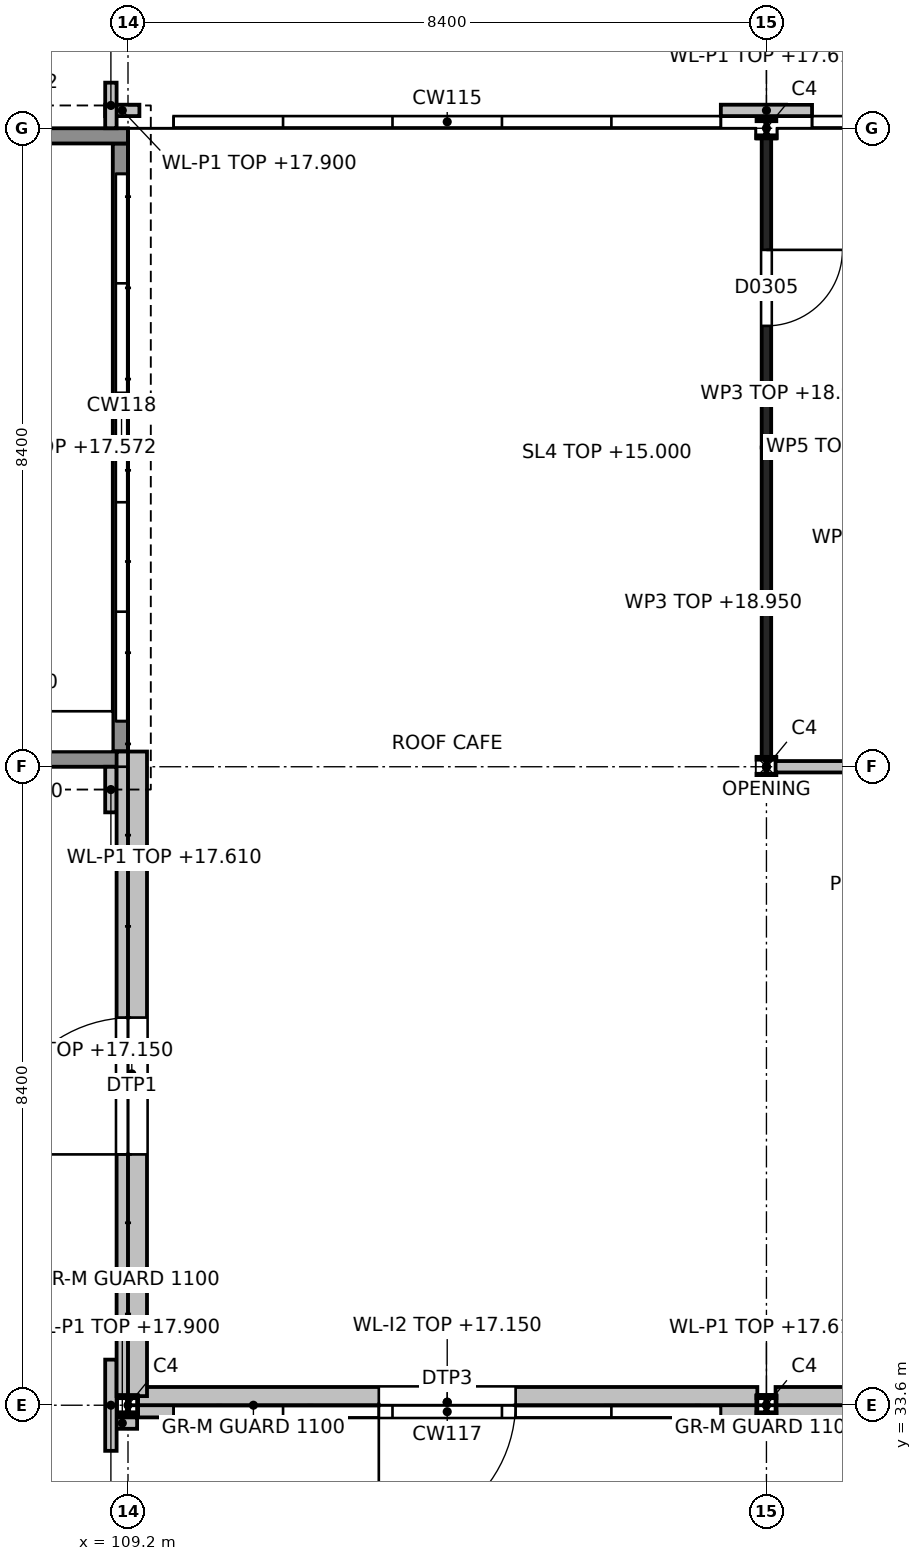
"""IFC4 building model, lengths in metres.
Left out: names, types, materials, properties, quantities, classifications, styles, units other than length and angle.
Written with IfcOpenShell. Run it as: python <this file> out.ifc"""

import sys

from ifc_helpers import new_model, si_unit, direction, frame, frame_2d, origin, origin_2d, place, context, subcontext, project, spatial, polyline, rectangle, i_section, outline, extrude, element, fill, save


model = new_model("IFC4")
c1 = context("Model", 3, precision=1e-05, world=origin(), true_north=direction((0.0, 1.0)))
c2 = subcontext(c1, "Body", "Model", "MODEL_VIEW")
j1 = project(units=[si_unit("LENGTHUNIT", "METRE"), si_unit("PLANEANGLEUNIT", "RADIAN")], contexts=[c1])
p1 = place(None, origin())
s1 = spatial("IfcSite", under=j1, at=p1, CompositionType="ELEMENT")
p2 = place(p1, origin())
s2 = spatial("IfcBuilding", under=s1, at=p2, CompositionType="ELEMENT")
p3 = place(p2, frame((0.0, 0.0, 15.0)))
s3 = spatial("IfcBuildingStorey", under=s2, at=p3, CompositionType="ELEMENT", Elevation=15.0)
for number, where, z_axis, x_axis in (
    (1, (109.2, 33.6, 0.0), (0.0, 0.0, 1.0), (1.0, 0.0, 0.0)),
    (2, (117.6, 33.6, 0.0), (0.0, 0.0, 1.0), (1.0, 0.0, 0.0)),
):
    element("IfcColumn", number, at=place(p3, frame(where, z_axis=z_axis, x_axis=x_axis)), inside=s3, PredefinedType="COLUMN", context=c2, shape_type="SweptSolid", body=[
        extrude(i_section(OverallWidth=0.24, OverallDepth=0.24, WebThickness=0.01, FlangeThickness=0.017, at=origin_2d()), origin(), (0.0, 0.0, 1.0), 2.635),
    ])
p4 = place(p3, frame((117.6, 42.0, 0.0), z_axis=(0.0, 0.0, 1.0), x_axis=(1.0, 0.0, 0.0)))
e3 = element("IfcColumn", 3, at=p4, inside=s3, PredefinedType="COLUMN", context=c2, shape_type="SweptSolid", body=[
    extrude(i_section(OverallWidth=0.24, OverallDepth=0.24, WebThickness=0.01, FlangeThickness=0.017, at=origin_2d()), origin(), (0.0, 0.0, 1.0), 10.198),
])
p5 = place(p3, frame((117.6, 50.4, 0.0), z_axis=(0.0, 0.0, 1.0), x_axis=(1.0, 0.0, 0.0)))
e4 = element("IfcColumn", 4, at=p5, inside=s3, PredefinedType="COLUMN", context=c2, shape_type="SweptSolid", body=[
    extrude(i_section(OverallWidth=0.24, OverallDepth=0.24, WebThickness=0.01, FlangeThickness=0.017, at=origin_2d()), origin(), (0.0, 0.0, 1.0), 2.635),
])
p6 = place(p3, frame((105.0, 42.1, 0.0), z_axis=(0.0, 0.0, 1.0), x_axis=(1.0, 0.0, 0.0)))
e5 = element("IfcWall", 5, at=p6, inside=s3, PredefinedType="SHEAR", context=c2, shape_type="SweptSolid", body=[
    extrude(outline(polyline([(0.0, 0.0), (4.2, 0.0), (4.2, 2.572), (3.953, 3.02), (0.0, 3.02), (0.0, 0.0)])), frame((0.0, 0.1, 0.0), z_axis=(0.0, -1.0, 0.0), x_axis=(1.0, 0.0, 0.0)), (0.0, 0.0, 1.0), 0.2),
])
p7 = place(p6, frame((1.55, 0.0, 0.0)))
e6 = element("IfcOpeningElement", 6, at=p7, cuts=e5, PredefinedType="OPENING", context=c2, shape_type="SweptSolid", body=[
    extrude(rectangle(XDim=1.1, YDim=2.1, at=frame_2d((0.55, 1.05))), frame((0.0, 0.1, 0.0), z_axis=(0.0, -1.0, 0.0), x_axis=(1.0, 0.0, 0.0)), (0.0, 0.0, 1.0), 0.2),
])
p8 = place(p3, frame((105.0, 50.3, 0.0), z_axis=(0.0, 0.0, 1.0), x_axis=(1.0, 0.0, 0.0)))
e7 = element("IfcWall", 7, at=p8, inside=s3, PredefinedType="SHEAR", context=c2, shape_type="SweptSolid", body=[
    extrude(outline(polyline([(0.0, 0.0), (4.2, 0.0), (4.2, 2.572), (0.0, 2.572), (0.0, 0.0)])), frame((0.0, 0.1, 0.0), z_axis=(0.0, -1.0, 0.0), x_axis=(1.0, 0.0, 0.0)), (0.0, 0.0, 1.0), 0.2),
])
p9 = place(p3, frame((109.1, 42.2, 0.0), z_axis=(0.0, 0.0, 1.0), x_axis=(0.0, 1.0, 0.0)))
e8 = element("IfcWall", 8, at=p9, inside=s3, PredefinedType="SHEAR", context=c2, shape_type="SweptSolid", body=[
    extrude(outline(polyline([(0.0, 0.0), (8.0, 0.0), (8.0, 2.572), (0.0, 2.572), (0.0, 0.0)])), frame((0.0, 0.1, 0.0), z_axis=(0.0, -1.0, 0.0), x_axis=(1.0, 0.0, 0.0)), (0.0, 0.0, 1.0), 0.2),
])
p10 = place(p3, frame((108.9, 50.635, 0.0), z_axis=(0.0, 0.0, 1.0), x_axis=(1.0, 0.0, 0.0)))
e9 = element("IfcWall", 9, at=p10, inside=s3, PredefinedType="SOLIDWALL", context=c2, shape_type="SweptSolid", body=[
    extrude(rectangle(XDim=0.45, YDim=0.15, at=frame_2d((0.225, 0.0))), origin(), (0.0, 0.0, 1.0), 2.9),
])
p11 = place(p3, frame((117.0, 50.635, 0.0), z_axis=(0.0, 0.0, 1.0), x_axis=(1.0, 0.0, 0.0)))
e10 = element("IfcWall", 10, at=p11, inside=s3, PredefinedType="SOLIDWALL", context=c2, shape_type="SweptSolid", body=[
    extrude(rectangle(XDim=1.2, YDim=0.15, at=frame_2d((0.6, 0.0))), origin(), (0.0, 0.0, 1.0), 2.61),
])
p12 = place(p3, frame((109.32, 33.64, 0.0), z_axis=(0.0, 0.0, 1.0), x_axis=(1.0, 0.0, 0.0)))
e11 = element("IfcWall", 11, at=p12, inside=s3, PredefinedType="SOLIDWALL", context=c2, shape_type="SweptSolid", body=[
    extrude(rectangle(XDim=8.16, YDim=0.4, at=frame_2d((4.08, 0.0))), origin(), (0.0, 0.0, 1.0), 2.15),
])
p13 = place(p12, frame((3.18, 0.0, 0.0)))
e12 = element("IfcOpeningElement", 12, at=p13, cuts=e11, PredefinedType="OPENING", context=c2, shape_type="SweptSolid", body=[
    extrude(rectangle(XDim=1.8, YDim=2.4, at=frame_2d((0.9, 1.2))), frame((0.0, 0.2, 0.0), z_axis=(0.0, -1.0, 0.0), x_axis=(1.0, 0.0, 0.0)), (0.0, 0.0, 1.0), 0.4),
])
p14 = place(p3, frame((117.72, 33.64, 0.0), z_axis=(0.0, 0.0, 1.0), x_axis=(1.0, 0.0, 0.0)))
e13 = element("IfcWall", 13, at=p14, inside=s3, PredefinedType="SOLIDWALL", context=c2, shape_type="SweptSolid", body=[
    extrude(rectangle(XDim=8.16, YDim=0.4, at=frame_2d((4.08, 0.0))), origin(), (0.0, 0.0, 1.0), 2.15),
])
p15 = place(p14, frame((3.18, 0.0, 0.0)))
e14 = element("IfcOpeningElement", 14, at=p15, cuts=e13, PredefinedType="OPENING", context=c2, shape_type="SweptSolid", body=[
    extrude(rectangle(XDim=1.8, YDim=2.4, at=frame_2d((0.9, 1.2))), frame((0.0, 0.2, 0.0), z_axis=(0.0, -1.0, 0.0), x_axis=(1.0, 0.0, 0.0)), (0.0, 0.0, 1.0), 0.4),
])
p16 = place(p3, frame((108.93, 33.365, 0.0), z_axis=(0.0, 0.0, 1.0), x_axis=(1.0, 0.0, 0.0)))
e15 = element("IfcWall", 15, at=p16, inside=s3, PredefinedType="SOLIDWALL", context=c2, shape_type="SweptSolid", body=[
    extrude(rectangle(XDim=0.39, YDim=0.15, at=frame_2d((0.195, 0.0))), origin(), (0.0, 0.0, 1.0), 2.9),
])
p17 = place(p3, frame((117.0, 33.365, 0.0), z_axis=(0.0, 0.0, 1.0), x_axis=(1.0, 0.0, 0.0)))
e16 = element("IfcWall", 16, at=p17, inside=s3, PredefinedType="SOLIDWALL", context=c2, shape_type="SweptSolid", body=[
    extrude(rectangle(XDim=1.2, YDim=0.15, at=frame_2d((0.6, 0.0))), origin(), (0.0, 0.0, 1.0), 2.61),
])
p18 = place(p3, frame((109.25, 33.72, 0.0), z_axis=(0.0, 0.0, 1.0), x_axis=(0.0, 1.0, 0.0)))
e17 = element("IfcWall", 17, at=p18, inside=s3, PredefinedType="SOLIDWALL", context=c2, shape_type="SweptSolid", body=[
    extrude(rectangle(XDim=8.48, YDim=0.4, at=frame_2d((4.24, 0.0))), origin(), (0.0, 0.0, 1.0), 2.15),
])
p19 = place(p18, frame((3.18, 0.0, 0.0)))
e18 = element("IfcOpeningElement", 18, at=p19, cuts=e17, PredefinedType="OPENING", context=c2, shape_type="SweptSolid", body=[
    extrude(rectangle(XDim=1.8, YDim=2.4, at=frame_2d((0.9, 1.2))), frame((0.0, 0.2, 0.0), z_axis=(0.0, -1.0, 0.0), x_axis=(1.0, 0.0, 0.0)), (0.0, 0.0, 1.0), 0.4),
])
p20 = place(p3, frame((108.975, 33.0, 0.0), z_axis=(0.0, 0.0, 1.0), x_axis=(0.0, 1.0, 0.0)))
e19 = element("IfcWall", 19, at=p20, inside=s3, PredefinedType="SOLIDWALL", context=c2, shape_type="SweptSolid", body=[
    extrude(rectangle(XDim=1.2, YDim=0.15, at=frame_2d((0.6, 0.0))), origin(), (0.0, 0.0, 1.0), 2.61),
])
p21 = place(p3, frame((108.975, 41.4, 0.0), z_axis=(0.0, 0.0, 1.0), x_axis=(0.0, 1.0, 0.0)))
e20 = element("IfcWall", 20, at=p21, inside=s3, PredefinedType="SOLIDWALL", context=c2, shape_type="SweptSolid", body=[
    extrude(rectangle(XDim=0.6, YDim=0.15, at=frame_2d((0.3, 0.0))), origin(), (0.0, 0.0, 1.0), 2.61),
])
p22 = place(p3, frame((108.975, 50.4, 0.0), z_axis=(0.0, 0.0, 1.0), x_axis=(0.0, 1.0, 0.0)))
e21 = element("IfcWall", 21, at=p22, inside=s3, PredefinedType="SOLIDWALL", context=c2, shape_type="SweptSolid", body=[
    extrude(rectangle(XDim=0.6, YDim=0.15, at=frame_2d((0.3, 0.0))), origin(), (0.0, 0.0, 1.0), 2.9),
])
p23 = place(p3, frame((117.6, 42.12, 0.0), z_axis=(0.0, 0.0, 1.0), x_axis=(0.0, 1.0, 0.0)))
e22 = element("IfcWall", 22, at=p23, inside=s3, PredefinedType="PARTITIONING", context=c2, shape_type="SweptSolid", body=[
    extrude(rectangle(XDim=4.08, YDim=0.125, at=frame_2d((2.04, 0.0))), origin(), (0.0, 0.0, 1.0), 3.95),
])
p24 = place(p3, frame((117.6, 46.2, 0.0), z_axis=(0.0, 0.0, 1.0), x_axis=(0.0, 1.0, 0.0)))
e23 = element("IfcWall", 23, at=p24, inside=s3, PredefinedType="PARTITIONING", context=c2, shape_type="SweptSolid", body=[
    extrude(rectangle(XDim=4.08, YDim=0.125, at=frame_2d((2.04, 0.0))), origin(), (0.0, 0.0, 1.0), 3.95),
])
p25 = place(p24, frame((1.6, 0.0, 0.0)))
e24 = element("IfcOpeningElement", 24, at=p25, cuts=e23, PredefinedType="OPENING", context=c2, shape_type="SweptSolid", body=[
    extrude(rectangle(XDim=1.0, YDim=2.1, at=frame_2d((0.5, 1.05))), frame((0.0, 0.062, 0.0), z_axis=(0.0, -1.0, 0.0), x_axis=(1.0, 0.0, 0.0)), (0.0, 0.0, 1.0), 0.125),
])
p26 = place(p3, frame((117.72, 42.0, 0.0), z_axis=(0.0, 0.0, 1.0), x_axis=(1.0, 0.0, 0.0)))
e25 = element("IfcWall", 25, at=p26, inside=s3, PredefinedType="PARTITIONING", context=c2, shape_type="SweptSolid", body=[
    extrude(rectangle(XDim=4.08, YDim=0.15, at=frame_2d((2.04, 0.0))), origin(), (0.0, 0.0, 1.0), 3.95),
])
p27 = place(p26, frame((1.48, 0.0, 0.0)))
e26 = element("IfcOpeningElement", 26, at=p27, cuts=e25, PredefinedType="OPENING", context=c2, shape_type="SweptSolid", body=[
    extrude(rectangle(XDim=0.9, YDim=2.1, at=frame_2d((0.45, 1.05))), frame((0.0, 0.075, 0.0), z_axis=(0.0, -1.0, 0.0), x_axis=(1.0, 0.0, 0.0)), (0.0, 0.0, 1.0), 0.15),
])
p28 = place(p3, frame((117.6, 46.2, 0.0), z_axis=(0.0, 0.0, 1.0), x_axis=(1.0, 0.0, 0.0)))
e27 = element("IfcWall", 27, at=p28, inside=s3, PredefinedType="PARTITIONING", context=c2, shape_type="SweptSolid", body=[
    extrude(rectangle(XDim=4.2, YDim=0.125, at=frame_2d((2.1, 0.0))), origin(), (0.0, 0.0, 1.0), 3.95),
])
p29 = place(p13, origin())
e28 = element("IfcDoor", 28, at=p29, inside=s3, OperationType="DOUBLE_DOOR_SINGLE_SWING", PredefinedType="DOOR", context=c2, shape_type="SweptSolid", body=[
    extrude(rectangle(XDim=1.8, YDim=2.4, at=frame_2d((0.9, 1.2))), frame((0.0, 0.025, 0.0), z_axis=(0.0, -1.0, 0.0), x_axis=(1.0, 0.0, 0.0)), (0.0, 0.0, 1.0), 0.05),
])
fill(e12, e28)
p30 = place(p19, origin())
e29 = element("IfcDoor", 29, at=p30, inside=s3, OperationType="DOUBLE_DOOR_SINGLE_SWING", PredefinedType="DOOR", context=c2, shape_type="SweptSolid", body=[
    extrude(rectangle(XDim=1.8, YDim=2.4, at=frame_2d((0.9, 1.2))), frame((0.0, 0.025, 0.0), z_axis=(0.0, -1.0, 0.0), x_axis=(1.0, 0.0, 0.0)), (0.0, 0.0, 1.0), 0.05),
])
fill(e18, e29)
p31 = place(p25, origin())
e30 = element("IfcDoor", 30, at=p31, inside=s3, OperationType="SINGLE_SWING_RIGHT", PredefinedType="DOOR", context=c2, shape_type="SweptSolid", body=[
    extrude(rectangle(XDim=1.0, YDim=2.1, at=frame_2d((0.5, 1.05))), frame((0.0, 0.025, 0.0), z_axis=(0.0, -1.0, 0.0), x_axis=(1.0, 0.0, 0.0)), (0.0, 0.0, 1.0), 0.05),
])
fill(e24, e30)
save(model, sys.argv[1])
